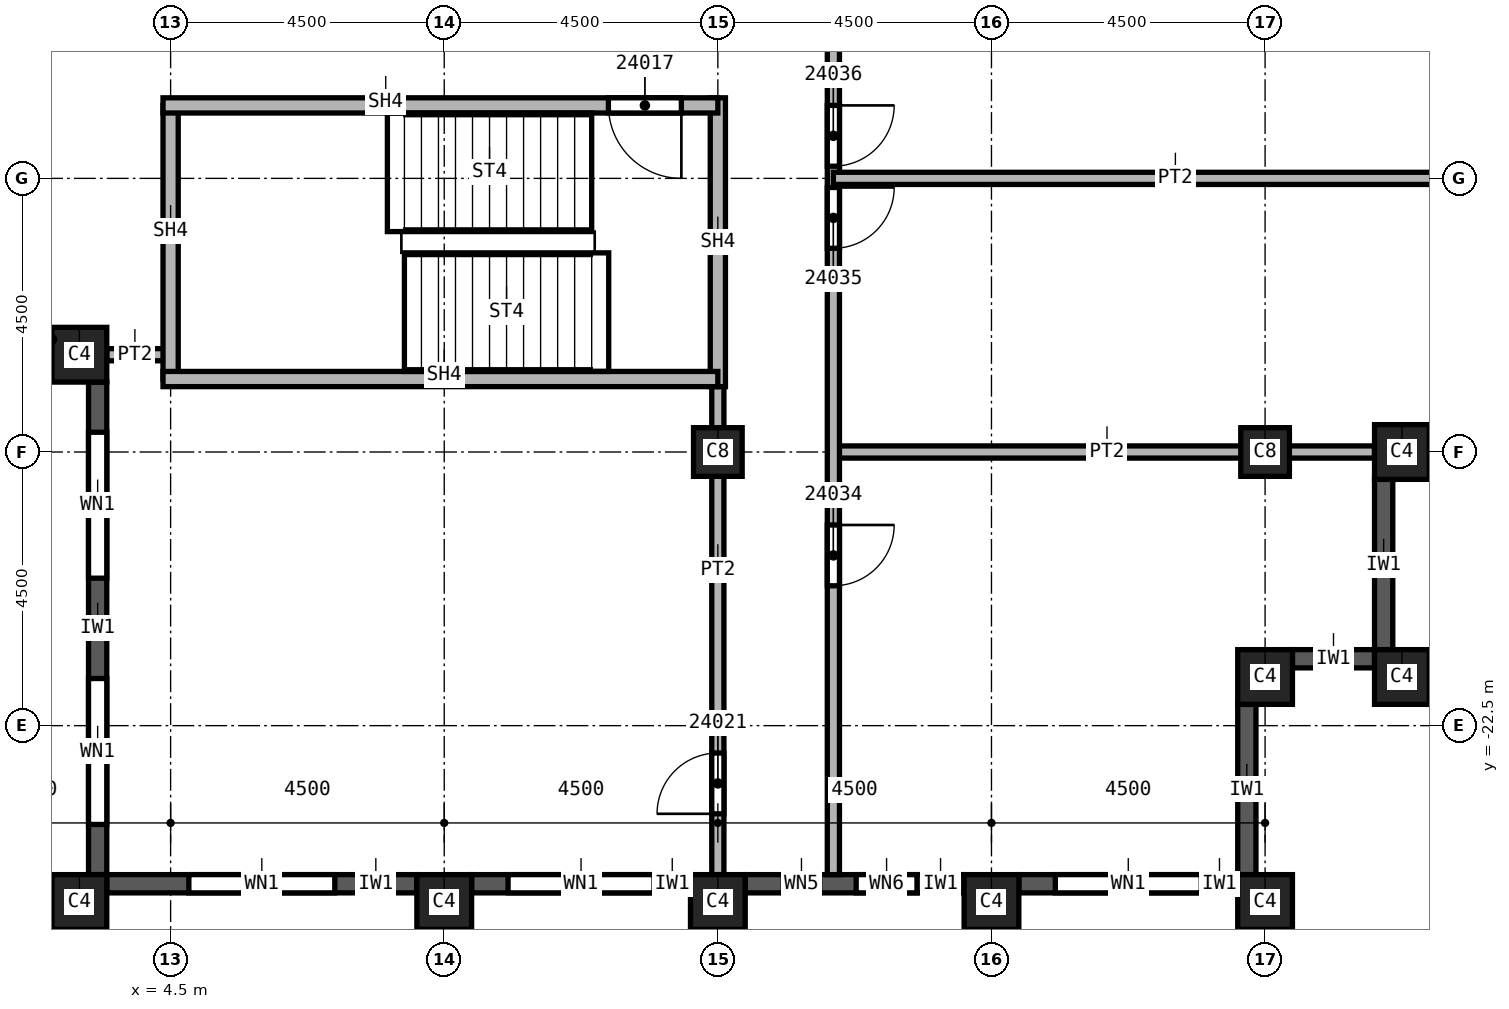
"""IFC4 building model, lengths in metres.
Left out: names, types, materials, properties, quantities, classifications, styles, units other than length and angle.
Written with IfcOpenShell. Run it as: python <this file> out.ifc"""

import sys

from ifc_helpers import new_model, si_unit, direction, frame, frame_2d, origin, origin_2d, place, context, subcontext, project, spatial, rectangle, extrude, element, fill, save


model = new_model("IFC4")
c1 = context("Model", 3, precision=1e-05, world=origin(), true_north=direction((0.0, 1.0)))
c2 = subcontext(c1, "Body", "Model", "MODEL_VIEW")
j1 = project(units=[si_unit("LENGTHUNIT", "METRE"), si_unit("PLANEANGLEUNIT", "RADIAN")], contexts=[c1])
p1 = place(None, origin())
s1 = spatial("IfcSite", under=j1, at=p1, CompositionType="ELEMENT")
p2 = place(p1, origin())
s2 = spatial("IfcBuilding", under=s1, at=p2, CompositionType="ELEMENT")
p3 = place(p2, frame((0.0, 0.0, 338.0)))
s3 = spatial("IfcBuildingStorey", under=s2, at=p3, CompositionType="ELEMENT", Elevation=338.0)
for number, where, z_axis, x_axis in (
    (1, (13.5, -18.0, 0.0), (0.0, 0.0, 1.0), (1.0, 0.0, 0.0)),
    (2, (22.5, -18.0, 0.0), (0.0, 0.0, 1.0), (1.0, 0.0, 0.0)),
):
    element("IfcColumn", number, at=place(p3, frame(where, z_axis=z_axis, x_axis=x_axis)), inside=s3, PredefinedType="COLUMN", context=c2, shape_type="SweptSolid", body=[
        extrude(rectangle(XDim=0.8, YDim=0.8, at=origin_2d()), origin(), (0.0, 0.0, 1.0), 3.74),
    ])
for number, where, z_axis, x_axis in (
    (3, (3.0, -25.4, 0.0), (0.0, 0.0, 1.0), (1.0, 0.0, 0.0)),
    (4, (9.0, -25.4, 0.0), (0.0, 0.0, 1.0), (1.0, 0.0, 0.0)),
    (5, (13.5, -25.4, 0.0), (0.0, 0.0, 1.0), (1.0, 0.0, 0.0)),
    (6, (18.0, -25.4, 0.0), (0.0, 0.0, 1.0), (1.0, 0.0, 0.0)),
    (7, (22.5, -25.4, 0.0), (0.0, 0.0, 1.0), (1.0, 0.0, 0.0)),
    (8, (3.0, -16.4, 0.0), (0.0, 0.0, 1.0), (1.0, 0.0, 0.0)),
    (9, (22.5, -21.7, 0.0), (0.0, 0.0, 1.0), (1.0, 0.0, 0.0)),
    (10, (24.75, -21.7, 0.0), (0.0, 0.0, 1.0), (1.0, 0.0, 0.0)),
    (11, (24.75, -18.0, 0.0), (0.0, 0.0, 1.0), (1.0, 0.0, 0.0)),
):
    element("IfcColumn", number, at=place(p3, frame(where, z_axis=z_axis, x_axis=x_axis)), inside=s3, PredefinedType="COLUMN", context=c2, shape_type="SweptSolid", body=[
        extrude(rectangle(XDim=0.9, YDim=0.9, at=origin_2d()), origin(), (0.0, 0.0, 1.0), 3.74),
    ])
p4 = place(p3, frame((3.3, -16.85, 0.0), z_axis=(0.0, 0.0, 1.0), x_axis=(0.0, -1.0, 0.0)))
e12 = element("IfcWall", 12, at=p4, inside=s3, PredefinedType="SOLIDWALL", context=c2, shape_type="SweptSolid", body=[
    extrude(rectangle(XDim=8.1, YDim=0.3, at=frame_2d((4.05, 0.0))), origin(), (0.0, 0.0, 1.0), 3.14),
])
p5 = place(p4, frame((0.825, 0.0, 0.8)))
e13 = element("IfcOpeningElement", 13, at=p5, cuts=e12, PredefinedType="OPENING", context=c2, shape_type="SweptSolid", body=[
    extrude(rectangle(XDim=2.4, YDim=1.95, at=frame_2d((1.2, 0.975))), frame((0.0, 0.15, 0.0), z_axis=(0.0, -1.0, 0.0), x_axis=(1.0, 0.0, 0.0)), (0.0, 0.0, 1.0), 0.3),
])
p6 = place(p4, frame((4.875, 0.0, 0.8)))
e14 = element("IfcOpeningElement", 14, at=p6, cuts=e12, PredefinedType="OPENING", context=c2, shape_type="SweptSolid", body=[
    extrude(rectangle(XDim=2.4, YDim=1.95, at=frame_2d((1.2, 0.975))), frame((0.0, 0.15, 0.0), z_axis=(0.0, -1.0, 0.0), x_axis=(1.0, 0.0, 0.0)), (0.0, 0.0, 1.0), 0.3),
])
p7 = place(p3, frame((3.45, -25.1, 0.0), z_axis=(0.0, 0.0, 1.0), x_axis=(1.0, 0.0, 0.0)))
e15 = element("IfcWall", 15, at=p7, inside=s3, PredefinedType="SOLIDWALL", context=c2, shape_type="SweptSolid", body=[
    extrude(rectangle(XDim=5.1, YDim=0.3, at=frame_2d((2.55, 0.0))), origin(), (0.0, 0.0, 1.0), 3.14),
])
p8 = place(p7, frame((1.35, 0.0, 0.8)))
e16 = element("IfcOpeningElement", 16, at=p8, cuts=e15, PredefinedType="OPENING", context=c2, shape_type="SweptSolid", body=[
    extrude(rectangle(XDim=2.4, YDim=1.95, at=frame_2d((1.2, 0.975))), frame((0.0, 0.15, 0.0), z_axis=(0.0, -1.0, 0.0), x_axis=(1.0, 0.0, 0.0)), (0.0, 0.0, 1.0), 0.3),
])
p9 = place(p3, frame((9.45, -25.1, 0.0), z_axis=(0.0, 0.0, 1.0), x_axis=(1.0, 0.0, 0.0)))
e17 = element("IfcWall", 17, at=p9, inside=s3, PredefinedType="SOLIDWALL", context=c2, shape_type="SweptSolid", body=[
    extrude(rectangle(XDim=3.6, YDim=0.3, at=frame_2d((1.8, 0.0))), origin(), (0.0, 0.0, 1.0), 3.14),
])
p10 = place(p9, frame((0.6, 0.0, 0.8)))
e18 = element("IfcOpeningElement", 18, at=p10, cuts=e17, PredefinedType="OPENING", context=c2, shape_type="SweptSolid", body=[
    extrude(rectangle(XDim=2.4, YDim=1.95, at=frame_2d((1.2, 0.975))), frame((0.0, 0.15, 0.0), z_axis=(0.0, -1.0, 0.0), x_axis=(1.0, 0.0, 0.0)), (0.0, 0.0, 1.0), 0.3),
])
p11 = place(p3, frame((13.95, -25.1, 0.0), z_axis=(0.0, 0.0, 1.0), x_axis=(1.0, 0.0, 0.0)))
e19 = element("IfcWall", 19, at=p11, inside=s3, PredefinedType="SOLIDWALL", context=c2, shape_type="SweptSolid", body=[
    extrude(rectangle(XDim=3.6, YDim=0.3, at=frame_2d((1.8, 0.0))), origin(), (0.0, 0.0, 1.0), 3.14),
])
p12 = place(p11, frame((0.625, 0.0, 0.8)))
e20 = element("IfcOpeningElement", 20, at=p12, cuts=e19, PredefinedType="OPENING", context=c2, shape_type="SweptSolid", body=[
    extrude(rectangle(XDim=0.6, YDim=1.95, at=frame_2d((0.3, 0.975))), frame((0.0, 0.15, 0.0), z_axis=(0.0, -1.0, 0.0), x_axis=(1.0, 0.0, 0.0)), (0.0, 0.0, 1.0), 0.3),
])
p13 = place(p11, frame((1.825, 0.0, 0.8)))
e21 = element("IfcOpeningElement", 21, at=p13, cuts=e19, PredefinedType="OPENING", context=c2, shape_type="SweptSolid", body=[
    extrude(rectangle(XDim=1.0, YDim=1.95, at=frame_2d((0.5, 0.975))), frame((0.0, 0.15, 0.0), z_axis=(0.0, -1.0, 0.0), x_axis=(1.0, 0.0, 0.0)), (0.0, 0.0, 1.0), 0.3),
])
p14 = place(p3, frame((18.45, -25.1, 0.0), z_axis=(0.0, 0.0, 1.0), x_axis=(1.0, 0.0, 0.0)))
e22 = element("IfcWall", 22, at=p14, inside=s3, PredefinedType="SOLIDWALL", context=c2, shape_type="SweptSolid", body=[
    extrude(rectangle(XDim=3.6, YDim=0.3, at=frame_2d((1.8, 0.0))), origin(), (0.0, 0.0, 1.0), 3.14),
])
p15 = place(p14, frame((0.6, 0.0, 0.8)))
e23 = element("IfcOpeningElement", 23, at=p15, cuts=e22, PredefinedType="OPENING", context=c2, shape_type="SweptSolid", body=[
    extrude(rectangle(XDim=2.4, YDim=1.95, at=frame_2d((1.2, 0.975))), frame((0.0, 0.15, 0.0), z_axis=(0.0, -1.0, 0.0), x_axis=(1.0, 0.0, 0.0)), (0.0, 0.0, 1.0), 0.3),
])
p16 = place(p3, frame((22.2, -24.95, 0.0), z_axis=(0.0, 0.0, 1.0), x_axis=(0.0, 1.0, 0.0)))
e24 = element("IfcWall", 24, at=p16, inside=s3, PredefinedType="SOLIDWALL", context=c2, shape_type="SweptSolid", body=[
    extrude(rectangle(XDim=2.8, YDim=0.3, at=frame_2d((1.4, 0.0))), origin(), (0.0, 0.0, 1.0), 3.14),
])
p17 = place(p3, frame((22.95, -21.4, 0.0), z_axis=(0.0, 0.0, 1.0), x_axis=(1.0, 0.0, 0.0)))
e25 = element("IfcWall", 25, at=p17, inside=s3, PredefinedType="SOLIDWALL", context=c2, shape_type="SweptSolid", body=[
    extrude(rectangle(XDim=1.35, YDim=0.3, at=frame_2d((0.675, 0.0))), origin(), (0.0, 0.0, 1.0), 3.14),
])
p18 = place(p3, frame((24.45, -21.25, 0.0), z_axis=(0.0, 0.0, 1.0), x_axis=(0.0, 1.0, 0.0)))
e26 = element("IfcWall", 26, at=p18, inside=s3, PredefinedType="SOLIDWALL", context=c2, shape_type="SweptSolid", body=[
    extrude(rectangle(XDim=2.8, YDim=0.3, at=frame_2d((1.4, 0.0))), origin(), (0.0, 0.0, 1.0), 3.14),
])
p19 = place(p3, frame((4.5, -16.4, 0.0), z_axis=(0.0, 0.0, 1.0), x_axis=(-1.0, 0.0, 0.0)))
e27 = element("IfcWall", 27, at=p19, inside=s3, PredefinedType="PARTITIONING", context=c2, shape_type="SweptSolid", body=[
    extrude(rectangle(XDim=1.05, YDim=0.2, at=frame_2d((0.525, 0.0))), origin(), (0.0, 0.0, 1.0), 3.74),
])
p20 = place(p3, frame((13.5, -24.95, 0.0), z_axis=(0.0, 0.0, 1.0), x_axis=(0.0, 1.0, 0.0)))
e28 = element("IfcWall", 28, at=p20, inside=s3, PredefinedType="PARTITIONING", context=c2, shape_type="SweptSolid", body=[
    extrude(rectangle(XDim=8.275, YDim=0.2, at=frame_2d((4.137, 0.0))), origin(), (0.0, 0.0, 1.0), 3.74),
])
p21 = place(p20, frame((1.0, 0.0, 0.0)))
e29 = element("IfcOpeningElement", 29, at=p21, cuts=e28, PredefinedType="OPENING", context=c2, shape_type="SweptSolid", body=[
    extrude(rectangle(XDim=1.0, YDim=2.1, at=frame_2d((0.5, 1.05))), frame((0.0, 0.1, 0.0), z_axis=(0.0, -1.0, 0.0), x_axis=(1.0, 0.0, 0.0)), (0.0, 0.0, 1.0), 0.2),
])
p22 = place(p3, frame((15.4, -18.0, 0.0), z_axis=(0.0, 0.0, 1.0), x_axis=(1.0, 0.0, 0.0)))
e30 = element("IfcWall", 30, at=p22, inside=s3, PredefinedType="PARTITIONING", context=c2, shape_type="SweptSolid", body=[
    extrude(rectangle(XDim=8.9, YDim=0.2, at=frame_2d((4.45, 0.0))), origin(), (0.0, 0.0, 1.0), 3.74),
])
p23 = place(p3, frame((15.4, 24.95, 0.0), z_axis=(0.0, 0.0, 1.0), x_axis=(0.0, -1.0, 0.0)))
e31 = element("IfcWall", 31, at=p23, inside=s3, PredefinedType="PARTITIONING", context=c2, shape_type="SweptSolid", body=[
    extrude(rectangle(XDim=49.9, YDim=0.2, at=frame_2d((24.95, 0.0))), origin(), (0.0, 0.0, 1.0), 3.74),
])
p24 = place(p23, frame((23.75, 0.0, 0.0)))
e32 = element("IfcOpeningElement", 32, at=p24, cuts=e31, PredefinedType="OPENING", context=c2, shape_type="SweptSolid", body=[
    extrude(rectangle(XDim=1.0, YDim=2.1, at=frame_2d((0.5, 1.05))), frame((0.0, 0.1, 0.0), z_axis=(0.0, -1.0, 0.0), x_axis=(1.0, 0.0, 0.0)), (0.0, 0.0, 1.0), 0.2),
])
p25 = place(p23, frame((18.65, 0.0, 0.0)))
e33 = element("IfcOpeningElement", 33, at=p25, cuts=e31, PredefinedType="OPENING", context=c2, shape_type="SweptSolid", body=[
    extrude(rectangle(XDim=1.0, YDim=2.1, at=frame_2d((0.5, 1.05))), frame((0.0, 0.1, 0.0), z_axis=(0.0, -1.0, 0.0), x_axis=(1.0, 0.0, 0.0)), (0.0, 0.0, 1.0), 0.2),
])
p26 = place(p23, frame((7.45, 0.0, 0.0)))
e34 = element("IfcOpeningElement", 34, at=p26, cuts=e31, PredefinedType="OPENING", context=c2, shape_type="SweptSolid", body=[
    extrude(rectangle(XDim=1.0, YDim=2.1, at=frame_2d((0.5, 1.05))), frame((0.0, 0.1, 0.0), z_axis=(0.0, -1.0, 0.0), x_axis=(1.0, 0.0, 0.0)), (0.0, 0.0, 1.0), 0.2),
])
p27 = place(p23, frame((44.15, 0.0, 0.0)))
e35 = element("IfcOpeningElement", 35, at=p27, cuts=e31, PredefinedType="OPENING", context=c2, shape_type="SweptSolid", body=[
    extrude(rectangle(XDim=1.0, YDim=2.1, at=frame_2d((0.5, 1.05))), frame((0.0, 0.1, 0.0), z_axis=(0.0, -1.0, 0.0), x_axis=(1.0, 0.0, 0.0)), (0.0, 0.0, 1.0), 0.2),
])
p28 = place(p23, frame((38.6, 0.0, 0.0)))
e36 = element("IfcOpeningElement", 36, at=p28, cuts=e31, PredefinedType="OPENING", context=c2, shape_type="SweptSolid", body=[
    extrude(rectangle(XDim=1.0, YDim=2.1, at=frame_2d((0.5, 1.05))), frame((0.0, 0.1, 0.0), z_axis=(0.0, -1.0, 0.0), x_axis=(1.0, 0.0, 0.0)), (0.0, 0.0, 1.0), 0.2),
])
p29 = place(p23, frame((37.25, 0.0, 0.0)))
e37 = element("IfcOpeningElement", 37, at=p29, cuts=e31, PredefinedType="OPENING", context=c2, shape_type="SweptSolid", body=[
    extrude(rectangle(XDim=1.0, YDim=2.1, at=frame_2d((0.5, 1.05))), frame((0.0, 0.1, 0.0), z_axis=(0.0, -1.0, 0.0), x_axis=(1.0, 0.0, 0.0)), (0.0, 0.0, 1.0), 0.2),
])
p30 = place(p23, frame((32.75, 0.0, 0.0)))
e38 = element("IfcOpeningElement", 38, at=p30, cuts=e31, PredefinedType="OPENING", context=c2, shape_type="SweptSolid", body=[
    extrude(rectangle(XDim=1.0, YDim=2.1, at=frame_2d((0.5, 1.05))), frame((0.0, 0.1, 0.0), z_axis=(0.0, -1.0, 0.0), x_axis=(1.0, 0.0, 0.0)), (0.0, 0.0, 1.0), 0.2),
])
p31 = place(p23, frame((27.65, 0.0, 0.0)))
e39 = element("IfcOpeningElement", 39, at=p31, cuts=e31, PredefinedType="OPENING", context=c2, shape_type="SweptSolid", body=[
    extrude(rectangle(XDim=1.0, YDim=2.1, at=frame_2d((0.5, 1.05))), frame((0.0, 0.1, 0.0), z_axis=(0.0, -1.0, 0.0), x_axis=(1.0, 0.0, 0.0)), (0.0, 0.0, 1.0), 0.2),
])
p32 = place(p3, frame((15.4, -13.5, 0.0), z_axis=(0.0, 0.0, 1.0), x_axis=(1.0, 0.0, 0.0)))
e40 = element("IfcWall", 40, at=p32, inside=s3, PredefinedType="PARTITIONING", context=c2, shape_type="SweptSolid", body=[
    extrude(rectangle(XDim=11.15, YDim=0.2, at=frame_2d((5.575, 0.0))), origin(), (0.0, 0.0, 1.0), 3.74),
])
p33 = place(p3, frame((4.5, -16.8, 0.0), z_axis=(0.0, 0.0, 1.0), x_axis=(0.0, 1.0, 0.0)))
e41 = element("IfcWall", 41, at=p33, inside=s3, PredefinedType="SOLIDWALL", context=c2, shape_type="SweptSolid", body=[
    extrude(rectangle(XDim=4.5, YDim=0.25, at=frame_2d((2.25, 0.0))), origin(), (0.0, 0.0, 1.0), 3.74),
])
p34 = place(p3, frame((13.5, -16.925, 0.0), z_axis=(0.0, 0.0, 1.0), x_axis=(0.0, 1.0, 0.0)))
e42 = element("IfcWall", 42, at=p34, inside=s3, PredefinedType="SOLIDWALL", context=c2, shape_type="SweptSolid", body=[
    extrude(rectangle(XDim=4.75, YDim=0.25, at=frame_2d((2.375, 0.0))), origin(), (0.0, 0.0, 1.0), 3.74),
])
p35 = place(p3, frame((13.5, -16.8, 0.0), z_axis=(0.0, 0.0, 1.0), x_axis=(-1.0, 0.0, 0.0)))
e43 = element("IfcWall", 43, at=p35, inside=s3, PredefinedType="SOLIDWALL", context=c2, shape_type="SweptSolid", body=[
    extrude(rectangle(XDim=9.125, YDim=0.25, at=frame_2d((4.562, 0.0))), origin(), (0.0, 0.0, 1.0), 3.74),
])
p36 = place(p3, frame((13.5, -12.3, 0.0), z_axis=(0.0, 0.0, 1.0), x_axis=(-1.0, 0.0, 0.0)))
e44 = element("IfcWall", 44, at=p36, inside=s3, PredefinedType="SOLIDWALL", context=c2, shape_type="SweptSolid", body=[
    extrude(rectangle(XDim=9.125, YDim=0.25, at=frame_2d((4.562, 0.0))), origin(), (0.0, 0.0, 1.0), 3.74),
])
p37 = place(p36, frame((0.6, 0.0, 0.0)))
e45 = element("IfcOpeningElement", 45, at=p37, cuts=e44, PredefinedType="OPENING", context=c2, shape_type="SweptSolid", body=[
    extrude(rectangle(XDim=1.2, YDim=2.1, at=frame_2d((0.6, 1.05))), frame((0.0, 0.125, 0.0), z_axis=(0.0, -1.0, 0.0), x_axis=(1.0, 0.0, 0.0)), (0.0, 0.0, 1.0), 0.25),
])
p38 = place(p5, origin())
e46 = element("IfcWindow", 46, at=p38, inside=s3, PartitioningType="SINGLE_PANEL", PredefinedType="WINDOW", context=c2, shape_type="SweptSolid", body=[
    extrude(rectangle(XDim=2.4, YDim=1.95, at=frame_2d((1.2, 0.975))), frame((0.0, 0.03, 0.0), z_axis=(0.0, -1.0, 0.0), x_axis=(1.0, 0.0, 0.0)), (0.0, 0.0, 1.0), 0.06),
])
fill(e13, e46)
p39 = place(p6, origin())
e47 = element("IfcWindow", 47, at=p39, inside=s3, PartitioningType="SINGLE_PANEL", PredefinedType="WINDOW", context=c2, shape_type="SweptSolid", body=[
    extrude(rectangle(XDim=2.4, YDim=1.95, at=frame_2d((1.2, 0.975))), frame((0.0, 0.03, 0.0), z_axis=(0.0, -1.0, 0.0), x_axis=(1.0, 0.0, 0.0)), (0.0, 0.0, 1.0), 0.06),
])
fill(e14, e47)
p40 = place(p8, origin())
e48 = element("IfcWindow", 48, at=p40, inside=s3, PartitioningType="SINGLE_PANEL", PredefinedType="WINDOW", context=c2, shape_type="SweptSolid", body=[
    extrude(rectangle(XDim=2.4, YDim=1.95, at=frame_2d((1.2, 0.975))), frame((0.0, 0.03, 0.0), z_axis=(0.0, -1.0, 0.0), x_axis=(1.0, 0.0, 0.0)), (0.0, 0.0, 1.0), 0.06),
])
fill(e16, e48)
p41 = place(p10, origin())
e49 = element("IfcWindow", 49, at=p41, inside=s3, PartitioningType="SINGLE_PANEL", PredefinedType="WINDOW", context=c2, shape_type="SweptSolid", body=[
    extrude(rectangle(XDim=2.4, YDim=1.95, at=frame_2d((1.2, 0.975))), frame((0.0, 0.03, 0.0), z_axis=(0.0, -1.0, 0.0), x_axis=(1.0, 0.0, 0.0)), (0.0, 0.0, 1.0), 0.06),
])
fill(e18, e49)
p42 = place(p15, origin())
e50 = element("IfcWindow", 50, at=p42, inside=s3, PartitioningType="SINGLE_PANEL", PredefinedType="WINDOW", context=c2, shape_type="SweptSolid", body=[
    extrude(rectangle(XDim=2.4, YDim=1.95, at=frame_2d((1.2, 0.975))), frame((0.0, 0.03, 0.0), z_axis=(0.0, -1.0, 0.0), x_axis=(1.0, 0.0, 0.0)), (0.0, 0.0, 1.0), 0.06),
])
fill(e23, e50)
p43 = place(p37, origin())
e51 = element("IfcDoor", 51, at=p43, inside=s3, OperationType="SINGLE_SWING_RIGHT", PredefinedType="DOOR", context=c2, shape_type="SweptSolid", body=[
    extrude(rectangle(XDim=1.2, YDim=2.1, at=frame_2d((0.6, 1.05))), frame((0.0, 0.025, 0.0), z_axis=(0.0, -1.0, 0.0), x_axis=(1.0, 0.0, 0.0)), (0.0, 0.0, 1.0), 0.05),
])
fill(e45, e51)
p44 = place(p21, origin())
e52 = element("IfcDoor", 52, at=p44, inside=s3, OperationType="SINGLE_SWING_RIGHT", PredefinedType="DOOR", context=c2, shape_type="SweptSolid", body=[
    extrude(rectangle(XDim=1.0, YDim=2.1, at=frame_2d((0.5, 1.05))), frame((0.0, 0.025, 0.0), z_axis=(0.0, -1.0, 0.0), x_axis=(1.0, 0.0, 0.0)), (0.0, 0.0, 1.0), 0.05),
])
fill(e29, e52)
p45 = place(p27, origin())
e53 = element("IfcDoor", 53, at=p45, inside=s3, OperationType="SINGLE_SWING_LEFT", PredefinedType="DOOR", context=c2, shape_type="SweptSolid", body=[
    extrude(rectangle(XDim=1.0, YDim=2.1, at=frame_2d((0.5, 1.05))), frame((0.0, 0.025, 0.0), z_axis=(0.0, -1.0, 0.0), x_axis=(1.0, 0.0, 0.0)), (0.0, 0.0, 1.0), 0.05),
])
fill(e35, e53)
p46 = place(p28, origin())
e54 = element("IfcDoor", 54, at=p46, inside=s3, OperationType="SINGLE_SWING_RIGHT", PredefinedType="DOOR", context=c2, shape_type="SweptSolid", body=[
    extrude(rectangle(XDim=1.0, YDim=2.1, at=frame_2d((0.5, 1.05))), frame((0.0, 0.025, 0.0), z_axis=(0.0, -1.0, 0.0), x_axis=(1.0, 0.0, 0.0)), (0.0, 0.0, 1.0), 0.05),
])
fill(e36, e54)
p47 = place(p29, origin())
e55 = element("IfcDoor", 55, at=p47, inside=s3, OperationType="SINGLE_SWING_LEFT", PredefinedType="DOOR", context=c2, shape_type="SweptSolid", body=[
    extrude(rectangle(XDim=1.0, YDim=2.1, at=frame_2d((0.5, 1.05))), frame((0.0, 0.025, 0.0), z_axis=(0.0, -1.0, 0.0), x_axis=(1.0, 0.0, 0.0)), (0.0, 0.0, 1.0), 0.05),
])
fill(e37, e55)
p48 = place(p12, origin())
e56 = element("IfcWindow", 56, at=p48, inside=s3, PartitioningType="SINGLE_PANEL", PredefinedType="WINDOW", context=c2, shape_type="SweptSolid", body=[
    extrude(rectangle(XDim=0.6, YDim=1.95, at=frame_2d((0.3, 0.975))), frame((0.0, 0.03, 0.0), z_axis=(0.0, -1.0, 0.0), x_axis=(1.0, 0.0, 0.0)), (0.0, 0.0, 1.0), 0.06),
])
fill(e20, e56)
p49 = place(p13, origin())
e57 = element("IfcWindow", 57, at=p49, inside=s3, PartitioningType="SINGLE_PANEL", PredefinedType="WINDOW", context=c2, shape_type="SweptSolid", body=[
    extrude(rectangle(XDim=1.0, YDim=1.95, at=frame_2d((0.5, 0.975))), frame((0.0, 0.03, 0.0), z_axis=(0.0, -1.0, 0.0), x_axis=(1.0, 0.0, 0.0)), (0.0, 0.0, 1.0), 0.06),
])
fill(e21, e57)
save(model, sys.argv[1])
